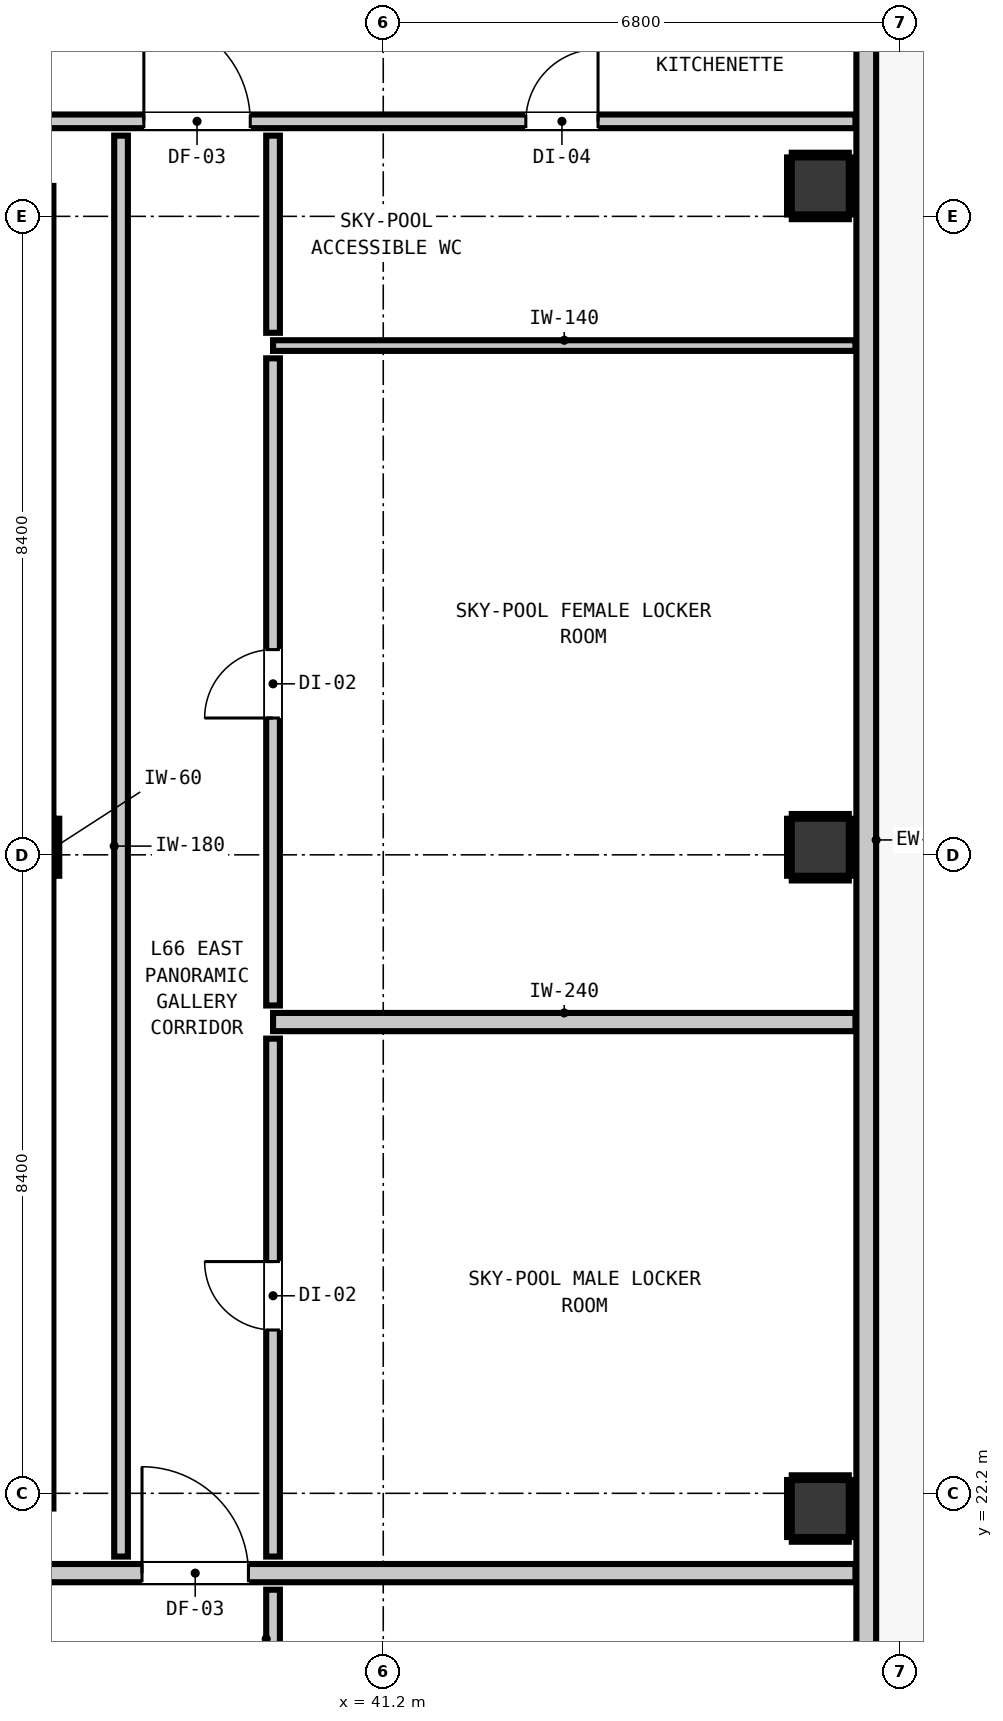
"""IFC4 building model, lengths in metres.
Left out: names, types, materials, properties, quantities, classifications, styles, units other than length and angle.
Written with IfcOpenShell. Run it as: python <this file> out.ifc"""

import sys

from ifc_helpers import new_model, si_unit, direction, frame, frame_2d, origin, origin_2d, place, context, subcontext, project, spatial, rectangle, extrude, element, fill, save


model = new_model("IFC4")
c1 = context("Model", 3, precision=1e-05, world=origin(), true_north=direction((0.0, 1.0)))
c2 = subcontext(c1, "Body", "Model", "MODEL_VIEW")
j1 = project(units=[si_unit("LENGTHUNIT", "METRE"), si_unit("PLANEANGLEUNIT", "RADIAN")], contexts=[c1])
p1 = place(None, origin())
s1 = spatial("IfcSite", under=j1, at=p1, CompositionType="ELEMENT")
p2 = place(p1, origin())
s2 = spatial("IfcBuilding", under=s1, at=p2, CompositionType="ELEMENT")
p3 = place(p2, frame((0.0, 0.0, 226.68)))
s3 = spatial("IfcBuildingStorey", under=s2, at=p3, CompositionType="ELEMENT", Elevation=226.68)
p4 = place(p3, frame((36.5, 30.7, 0.0), z_axis=(0.0, 0.0, 1.0), x_axis=(1.0, 0.0, 0.0)))
e1 = element("IfcColumn", 1, at=p4, inside=s3, PredefinedType="COLUMN", context=c2, shape_type="SweptSolid", body=[
    extrude(rectangle(XDim=0.75, YDim=0.75, at=origin_2d()), origin(), (0.0, 0.0, 1.0), 4.6),
])
p5 = place(p3, frame((36.46, 22.0, 0.0), z_axis=(0.0, 0.0, 1.0), x_axis=(0.0, 1.0, 0.0)))
e2 = element("IfcWall", 2, at=p5, inside=s3, PredefinedType="SHEAR", context=c2, shape_type="SweptSolid", body=[
    extrude(rectangle(XDim=8.32, YDim=0.8, at=frame_2d((4.16, 0.0))), origin(), (0.0, 0.0, 1.0), 4.6),
])
p6 = place(p3, frame((36.46, 31.08, 0.0), z_axis=(0.0, 0.0, 1.0), x_axis=(0.0, 1.0, 0.0)))
e3 = element("IfcWall", 3, at=p6, inside=s3, PredefinedType="SHEAR", context=c2, shape_type="SweptSolid", body=[
    extrude(rectangle(XDim=8.32, YDim=0.8, at=frame_2d((4.16, 0.0))), origin(), (0.0, 0.0, 1.0), 4.6),
])
for number, where, z_axis, x_axis in (
    (4, (46.95, 22.0, 0.0), (0.0, 0.0, 1.0), (1.0, 0.0, 0.0)),
    (5, (46.95, 30.7, 0.0), (0.0, 0.0, 1.0), (1.0, 0.0, 0.0)),
    (6, (46.95, 39.4, 0.0), (0.0, 0.0, 1.0), (1.0, 0.0, 0.0)),
):
    element("IfcColumn", number, at=place(p3, frame(where, z_axis=z_axis, x_axis=x_axis)), inside=s3, PredefinedType="COLUMN", context=c2, shape_type="SweptSolid", body=[
        extrude(rectangle(XDim=0.75, YDim=0.75, at=origin_2d()), origin(), (0.0, 0.0, 1.0), 4.18),
    ])
p7 = place(p3, frame((47.555, 42.655, 0.0), z_axis=(0.0, 0.0, 1.0), x_axis=(0.0, -1.0, 0.0)))
e7 = element("IfcWall", 7, at=p7, inside=s3, PredefinedType="STANDARD", context=c2, shape_type="SweptSolid", body=[
    extrude(rectangle(XDim=30.31, YDim=0.26, at=frame_2d((15.155, 0.0))), origin(), (0.0, 0.0, 1.0), 4.18),
])
p8 = place(p7, frame((23.818, 0.0, 0.0)))
e8 = element("IfcOpeningElement", 8, at=p8, cuts=e7, PredefinedType="OPENING", context=c2, shape_type="SweptSolid", body=[
    extrude(rectangle(XDim=1.0, YDim=2.15, at=frame_2d((0.5, 1.075))), frame((0.0, 0.14, 0.0), z_axis=(0.0, -1.0, 0.0), x_axis=(1.0, 0.0, 0.0)), (0.0, 0.0, 1.0), 0.28),
])
p9 = place(p3, frame((10.787, 21.15, 0.0), z_axis=(0.0, 0.0, 1.0), x_axis=(1.0, 0.0, 0.0)))
e9 = element("IfcWall", 9, at=p9, inside=s3, PredefinedType="PARTITIONING", context=c2, shape_type="SweptSolid", body=[
    extrude(rectangle(XDim=36.626, YDim=0.24, at=frame_2d((18.313, 0.0))), origin(), (0.0, 0.0, 1.0), 4.18),
])
p10 = place(p9, frame((7.423, 0.0, 0.0)))
e10 = element("IfcOpeningElement", 10, at=p10, cuts=e9, PredefinedType="OPENING", context=c2, shape_type="SweptSolid", body=[
    extrude(rectangle(XDim=1.1, YDim=2.15, at=frame_2d((0.55, 1.075))), frame((0.0, 0.13, 0.0), z_axis=(0.0, -1.0, 0.0), x_axis=(1.0, 0.0, 0.0)), (0.0, 0.0, 1.0), 0.26),
])
p11 = place(p9, frame((1.012, 0.0, 0.0)))
e11 = element("IfcOpeningElement", 11, at=p11, cuts=e9, PredefinedType="OPENING", context=c2, shape_type="SweptSolid", body=[
    extrude(rectangle(XDim=1.0, YDim=2.15, at=frame_2d((0.5, 1.075))), frame((0.0, 0.13, 0.0), z_axis=(0.0, -1.0, 0.0), x_axis=(1.0, 0.0, 0.0)), (0.0, 0.0, 1.0), 0.26),
])
p12 = place(p9, frame((27.239, 0.0, 0.0)))
e12 = element("IfcOpeningElement", 12, at=p12, cuts=e9, PredefinedType="OPENING", context=c2, shape_type="SweptSolid", body=[
    extrude(rectangle(XDim=1.4, YDim=2.15, at=frame_2d((0.7, 1.075))), frame((0.0, 0.13, 0.0), z_axis=(0.0, -1.0, 0.0), x_axis=(1.0, 0.0, 0.0)), (0.0, 0.0, 1.0), 0.26),
])
p13 = place(p3, frame((39.75, 28.4, 0.0), z_axis=(0.0, 0.0, 1.0), x_axis=(1.0, 0.0, 0.0)))
e13 = element("IfcWall", 13, at=p13, inside=s3, PredefinedType="PARTITIONING", context=c2, shape_type="SweptSolid", body=[
    extrude(rectangle(XDim=7.663, YDim=0.24, at=frame_2d((3.832, 0.0))), origin(), (0.0, 0.0, 1.0), 4.18),
])
p14 = place(p3, frame((10.787, 40.25, 0.0), z_axis=(0.0, 0.0, 1.0), x_axis=(1.0, 0.0, 0.0)))
e14 = element("IfcWall", 14, at=p14, inside=s3, PredefinedType="PARTITIONING", context=c2, shape_type="SweptSolid", body=[
    extrude(rectangle(XDim=36.626, YDim=0.18, at=frame_2d((18.313, 0.0))), origin(), (0.0, 0.0, 1.0), 4.18),
])
p15 = place(p14, frame((6.648, 0.0, 0.0)))
e15 = element("IfcOpeningElement", 15, at=p15, cuts=e14, PredefinedType="OPENING", context=c2, shape_type="SweptSolid", body=[
    extrude(rectangle(XDim=1.4, YDim=2.15, at=frame_2d((0.7, 1.075))), frame((0.0, 0.1, 0.0), z_axis=(0.0, -1.0, 0.0), x_axis=(1.0, 0.0, 0.0)), (0.0, 0.0, 1.0), 0.2),
])
p16 = place(p14, frame((1.012, 0.0, 0.0)))
e16 = element("IfcOpeningElement", 16, at=p16, cuts=e14, PredefinedType="OPENING", context=c2, shape_type="SweptSolid", body=[
    extrude(rectangle(XDim=1.0, YDim=2.15, at=frame_2d((0.5, 1.075))), frame((0.0, 0.1, 0.0), z_axis=(0.0, -1.0, 0.0), x_axis=(1.0, 0.0, 0.0)), (0.0, 0.0, 1.0), 0.2),
])
p17 = place(p14, frame((27.263, 0.0, 0.0)))
e17 = element("IfcOpeningElement", 17, at=p17, cuts=e14, PredefinedType="OPENING", context=c2, shape_type="SweptSolid", body=[
    extrude(rectangle(XDim=1.4, YDim=2.15, at=frame_2d((0.7, 1.075))), frame((0.0, 0.1, 0.0), z_axis=(0.0, -1.0, 0.0), x_axis=(1.0, 0.0, 0.0)), (0.0, 0.0, 1.0), 0.2),
])
p18 = place(p14, frame((32.289, 0.0, 0.0)))
e18 = element("IfcOpeningElement", 18, at=p18, cuts=e14, PredefinedType="OPENING", context=c2, shape_type="SweptSolid", body=[
    extrude(rectangle(XDim=0.95, YDim=2.1, at=frame_2d((0.475, 1.05))), frame((0.0, 0.1, 0.0), z_axis=(0.0, -1.0, 0.0), x_axis=(1.0, 0.0, 0.0)), (0.0, 0.0, 1.0), 0.2),
])
p19 = place(p3, frame((39.75, 37.3, 0.0), z_axis=(0.0, 0.0, 1.0), x_axis=(1.0, 0.0, 0.0)))
e19 = element("IfcWall", 19, at=p19, inside=s3, PredefinedType="PARTITIONING", context=c2, shape_type="SweptSolid", body=[
    extrude(rectangle(XDim=7.663, YDim=0.14, at=frame_2d((3.832, 0.0))), origin(), (0.0, 0.0, 1.0), 4.18),
])
p20 = place(p3, frame((37.75, 21.368, 0.0), z_axis=(0.0, 0.0, 1.0), x_axis=(0.0, 1.0, 0.0)))
e20 = element("IfcWall", 20, at=p20, inside=s3, PredefinedType="PARTITIONING", context=c2, shape_type="SweptSolid", body=[
    extrude(rectangle(XDim=18.694, YDim=0.18, at=frame_2d((9.347, 0.0))), origin(), (0.0, 0.0, 1.0), 4.18),
])
p21 = place(p3, frame((39.75, 19.638, 0.0), z_axis=(0.0, 0.0, 1.0), x_axis=(0.0, 1.0, 0.0)))
e21 = element("IfcWall", 21, at=p21, inside=s3, PredefinedType="PARTITIONING", context=c2, shape_type="SweptSolid", body=[
    extrude(rectangle(XDim=1.294, YDim=0.18, at=frame_2d((0.647, 0.0))), origin(), (0.0, 0.0, 1.0), 4.18),
])
p22 = place(p3, frame((39.75, 21.368, 0.0), z_axis=(0.0, 0.0, 1.0), x_axis=(0.0, 1.0, 0.0)))
e22 = element("IfcWall", 22, at=p22, inside=s3, PredefinedType="PARTITIONING", context=c2, shape_type="SweptSolid", body=[
    extrude(rectangle(XDim=6.814, YDim=0.18, at=frame_2d((3.407, 0.0))), origin(), (0.0, 0.0, 1.0), 4.18),
])
p23 = place(p22, frame((2.981, 0.0, 0.0)))
e23 = element("IfcOpeningElement", 23, at=p23, cuts=e22, PredefinedType="OPENING", context=c2, shape_type="SweptSolid", body=[
    extrude(rectangle(XDim=0.9, YDim=2.1, at=frame_2d((0.45, 1.05))), frame((0.0, 0.1, 0.0), z_axis=(0.0, -1.0, 0.0), x_axis=(1.0, 0.0, 0.0)), (0.0, 0.0, 1.0), 0.2),
])
p24 = place(p3, frame((39.75, 28.618, 0.0), z_axis=(0.0, 0.0, 1.0), x_axis=(0.0, 1.0, 0.0)))
e24 = element("IfcWall", 24, at=p24, inside=s3, PredefinedType="PARTITIONING", context=c2, shape_type="SweptSolid", body=[
    extrude(rectangle(XDim=8.514, YDim=0.18, at=frame_2d((4.257, 0.0))), origin(), (0.0, 0.0, 1.0), 4.18),
])
p25 = place(p24, frame((3.782, 0.0, 0.0)))
e25 = element("IfcOpeningElement", 25, at=p25, cuts=e24, PredefinedType="OPENING", context=c2, shape_type="SweptSolid", body=[
    extrude(rectangle(XDim=0.9, YDim=2.1, at=frame_2d((0.45, 1.05))), frame((0.0, 0.1, 0.0), z_axis=(0.0, -1.0, 0.0), x_axis=(1.0, 0.0, 0.0)), (0.0, 0.0, 1.0), 0.2),
])
p26 = place(p3, frame((39.75, 37.468, 0.0), z_axis=(0.0, 0.0, 1.0), x_axis=(0.0, 1.0, 0.0)))
e26 = element("IfcWall", 26, at=p26, inside=s3, PredefinedType="PARTITIONING", context=c2, shape_type="SweptSolid", body=[
    extrude(rectangle(XDim=2.594, YDim=0.18, at=frame_2d((1.297, 0.0))), origin(), (0.0, 0.0, 1.0), 4.18),
])
for number, where, z_axis, x_axis in (
    (27, (36.907, 30.325, 0.0), (0.0, 0.0, 1.0), (0.0, 1.0, 0.0)),
    (28, (46.575, 21.593, 0.0), (0.0, 0.0, 1.0), (1.0, 0.0, 0.0)),
    (29, (46.575, 22.407, 0.0), (0.0, 0.0, 1.0), (1.0, 0.0, 0.0)),
    (30, (46.543, 21.625, 0.0), (0.0, 0.0, 1.0), (0.0, 1.0, 0.0)),
    (31, (47.357, 21.625, 0.0), (0.0, 0.0, 1.0), (0.0, 1.0, 0.0)),
    (32, (46.575, 30.293, 0.0), (0.0, 0.0, 1.0), (1.0, 0.0, 0.0)),
    (33, (46.575, 31.107, 0.0), (0.0, 0.0, 1.0), (1.0, 0.0, 0.0)),
    (34, (46.543, 30.325, 0.0), (0.0, 0.0, 1.0), (0.0, 1.0, 0.0)),
    (35, (47.357, 30.325, 0.0), (0.0, 0.0, 1.0), (0.0, 1.0, 0.0)),
    (36, (46.575, 38.993, 0.0), (0.0, 0.0, 1.0), (1.0, 0.0, 0.0)),
    (37, (46.575, 39.807, 0.0), (0.0, 0.0, 1.0), (1.0, 0.0, 0.0)),
    (38, (46.543, 39.025, 0.0), (0.0, 0.0, 1.0), (0.0, 1.0, 0.0)),
    (39, (47.357, 39.025, 0.0), (0.0, 0.0, 1.0), (0.0, 1.0, 0.0)),
):
    element("IfcWall", number, at=place(p3, frame(where, z_axis=z_axis, x_axis=x_axis)), inside=s3, PredefinedType="PARTITIONING", context=c2, shape_type="SweptSolid", body=[
        extrude(rectangle(XDim=0.75, YDim=0.06, at=frame_2d((0.375, 0.0))), origin(), (0.0, 0.0, 1.0), 1.45),
    ])
p27 = place(p12, origin())
e40 = element("IfcDoor", 40, at=p27, inside=s3, OperationType="SINGLE_SWING_LEFT", PredefinedType="DOOR", context=c2, shape_type="SweptSolid", body=[
    extrude(rectangle(XDim=1.4, YDim=2.15, at=frame_2d((0.7, 1.075))), frame((0.0, 0.025, 0.0), z_axis=(0.0, -1.0, 0.0), x_axis=(1.0, 0.0, 0.0)), (0.0, 0.0, 1.0), 0.05),
])
fill(e12, e40)
p28 = place(p17, origin())
e41 = element("IfcDoor", 41, at=p28, inside=s3, OperationType="SINGLE_SWING_LEFT", PredefinedType="DOOR", context=c2, shape_type="SweptSolid", body=[
    extrude(rectangle(XDim=1.4, YDim=2.15, at=frame_2d((0.7, 1.075))), frame((0.0, 0.025, 0.0), z_axis=(0.0, -1.0, 0.0), x_axis=(1.0, 0.0, 0.0)), (0.0, 0.0, 1.0), 0.05),
])
fill(e17, e41)
p29 = place(p23, origin())
e42 = element("IfcDoor", 42, at=p29, inside=s3, OperationType="SINGLE_SWING_RIGHT", PredefinedType="DOOR", context=c2, shape_type="SweptSolid", body=[
    extrude(rectangle(XDim=0.9, YDim=2.1, at=frame_2d((0.45, 1.05))), frame((0.0, 0.025, 0.0), z_axis=(0.0, -1.0, 0.0), x_axis=(1.0, 0.0, 0.0)), (0.0, 0.0, 1.0), 0.05),
])
fill(e23, e42)
p30 = place(p25, origin())
e43 = element("IfcDoor", 43, at=p30, inside=s3, OperationType="SINGLE_SWING_LEFT", PredefinedType="DOOR", context=c2, shape_type="SweptSolid", body=[
    extrude(rectangle(XDim=0.9, YDim=2.1, at=frame_2d((0.45, 1.05))), frame((0.0, 0.025, 0.0), z_axis=(0.0, -1.0, 0.0), x_axis=(1.0, 0.0, 0.0)), (0.0, 0.0, 1.0), 0.05),
])
fill(e25, e43)
p31 = place(p18, origin())
e44 = element("IfcDoor", 44, at=p31, inside=s3, OperationType="SINGLE_SWING_RIGHT", PredefinedType="DOOR", context=c2, shape_type="SweptSolid", body=[
    extrude(rectangle(XDim=0.95, YDim=2.1, at=frame_2d((0.475, 1.05))), frame((0.0, 0.025, 0.0), z_axis=(0.0, -1.0, 0.0), x_axis=(1.0, 0.0, 0.0)), (0.0, 0.0, 1.0), 0.05),
])
fill(e18, e44)
save(model, sys.argv[1])
